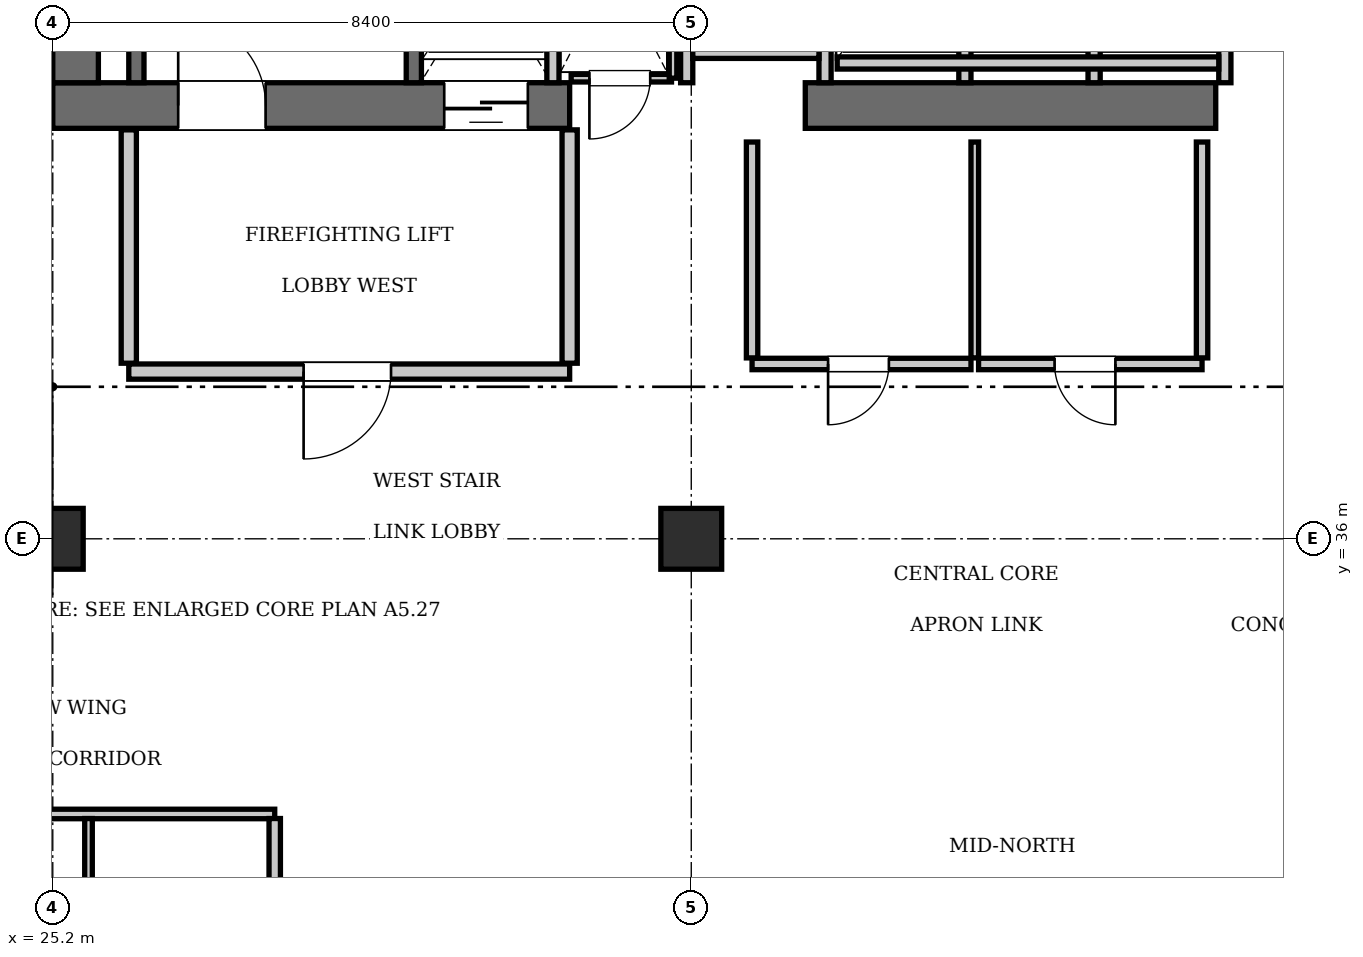
"""IFC4 building model, lengths in metres.
Left out: names, types, materials, properties, quantities, classifications, styles, units other than length and angle.
Written with IfcOpenShell. Run it as: python <this file> out.ifc"""

import sys

from ifc_helpers import new_model, si_unit, direction, frame, frame_2d, origin, origin_2d, place, context, subcontext, project, spatial, rectangle, extrude, element, fill, save


model = new_model("IFC4")
c1 = context("Model", 3, precision=1e-05, world=origin(), true_north=direction((0.0, 1.0)))
c2 = subcontext(c1, "Body", "Model", "MODEL_VIEW")
j1 = project(units=[si_unit("LENGTHUNIT", "METRE"), si_unit("PLANEANGLEUNIT", "RADIAN")], contexts=[c1])
p1 = place(None, origin())
s1 = spatial("IfcSite", under=j1, at=p1, CompositionType="ELEMENT")
p2 = place(p1, origin())
s2 = spatial("IfcBuilding", under=s1, at=p2, CompositionType="ELEMENT")
p3 = place(p2, frame((0.0, 0.0, 312.55)))
s3 = spatial("IfcBuildingStorey", under=s2, at=p3, CompositionType="ELEMENT", Elevation=312.55)
p4 = place(p3, frame((25.2, 41.7, 0.0), z_axis=(0.0, 0.0, 1.0), x_axis=(1.0, 0.0, 0.0)))
e1 = element("IfcWall", 1, at=p4, inside=s3, PredefinedType="SHEAR", context=c2, shape_type="SweptSolid", body=[
    extrude(rectangle(XDim=6.8, YDim=0.6, at=frame_2d((3.4, 0.0))), origin(), (0.0, 0.0, 1.0), 3.85),
])
p5 = place(p4, frame((1.65, 0.0, 0.0)))
e2 = element("IfcOpeningElement", 2, at=p5, cuts=e1, PredefinedType="OPENING", context=c2, shape_type="SweptSolid", body=[
    extrude(rectangle(XDim=1.15, YDim=2.15, at=frame_2d((0.575, 1.075))), frame((0.0, 0.31, 0.0), z_axis=(0.0, -1.0, 0.0), x_axis=(1.0, 0.0, 0.0)), (0.0, 0.0, 1.0), 0.62),
])
p6 = place(p4, frame((5.15, 0.0, 0.0)))
e3 = element("IfcOpeningElement", 3, at=p6, cuts=e1, PredefinedType="OPENING", context=c2, shape_type="SweptSolid", body=[
    extrude(rectangle(XDim=1.1, YDim=2.2, at=frame_2d((0.55, 1.1))), frame((0.0, 0.31, 0.0), z_axis=(0.0, -1.0, 0.0), x_axis=(1.0, 0.0, 0.0)), (0.0, 0.0, 1.0), 0.62),
])
p7 = place(p3, frame((35.1, 41.7, 0.0), z_axis=(0.0, 0.0, 1.0), x_axis=(1.0, 0.0, 0.0)))
e4 = element("IfcWall", 4, at=p7, inside=s3, PredefinedType="SHEAR", context=c2, shape_type="SweptSolid", body=[
    extrude(rectangle(XDim=5.4, YDim=0.6, at=frame_2d((2.7, 0.0))), origin(), (0.0, 0.0, 1.0), 3.85),
])
p8 = place(p3, frame((25.5, 42.0, 0.0), z_axis=(0.0, 0.0, 1.0), x_axis=(0.0, 1.0, 0.0)))
e5 = element("IfcWall", 5, at=p8, inside=s3, PredefinedType="SHEAR", context=c2, shape_type="SweptSolid", body=[
    extrude(rectangle(XDim=2.2, YDim=0.6, at=frame_2d((1.1, 0.0))), origin(), (0.0, 0.0, 1.0), 3.85),
])
for number, where, z_axis, x_axis in (
    (6, (25.2, 36.0, 0.0), (0.0, 0.0, 1.0), (1.0, 0.0, 0.0)),
    (7, (33.6, 36.0, 0.0), (0.0, 0.0, 1.0), (1.0, 0.0, 0.0)),
):
    element("IfcColumn", number, at=place(p3, frame(where, z_axis=z_axis, x_axis=x_axis)), inside=s3, PredefinedType="COLUMN", context=c2, shape_type="SweptSolid", body=[
        extrude(rectangle(XDim=0.8, YDim=0.8, at=origin_2d()), origin(), (0.0, 0.0, 1.0), 3.85),
    ])
p9 = place(p3, frame((29.95, 42.0, 0.0), z_axis=(0.0, 0.0, 1.0), x_axis=(0.0, 1.0, 0.0)))
e8 = element("IfcWall", 8, at=p9, inside=s3, PredefinedType="SOLIDWALL", context=c2, shape_type="SweptSolid", body=[
    extrude(rectangle(XDim=9.15, YDim=0.2, at=frame_2d((4.575, 0.0))), origin(), (0.0, 0.0, 1.0), 3.55),
])
p10 = place(p3, frame((26.3, 42.0, 0.0), z_axis=(0.0, 0.0, 1.0), x_axis=(0.0, 1.0, 0.0)))
e9 = element("IfcWall", 9, at=p10, inside=s3, PredefinedType="SOLIDWALL", context=c2, shape_type="SweptSolid", body=[
    extrude(rectangle(XDim=9.12, YDim=0.2, at=frame_2d((4.56, 0.0))), origin(), (0.0, 0.0, 1.0), 3.55),
])
p11 = place(p3, frame((31.78, 42.0, 0.0), z_axis=(0.0, 0.0, 1.0), x_axis=(0.0, 1.0, 0.0)))
e10 = element("IfcWall", 10, at=p11, inside=s3, PredefinedType="SOLIDWALL", context=c2, shape_type="SweptSolid", body=[
    extrude(rectangle(XDim=2.74, YDim=0.16, at=frame_2d((1.37, 0.0))), origin(), (0.0, 0.0, 1.0), 3.55),
])
for number, where, z_axis, x_axis in (
    (11, (37.2, 42.0, 0.0), (0.0, 0.0, 1.0), (0.0, 1.0, 0.0)),
    (12, (38.9, 42.0, 0.0), (0.0, 0.0, 1.0), (0.0, 1.0, 0.0)),
    (13, (40.62, 42.0, 0.0), (0.0, 0.0, 1.0), (0.0, 1.0, 0.0)),
):
    element("IfcWall", number, at=place(p3, frame(where, z_axis=z_axis, x_axis=x_axis)), inside=s3, PredefinedType="SOLIDWALL", context=c2, shape_type="SweptSolid", body=[
        extrude(rectangle(XDim=2.35, YDim=0.16, at=frame_2d((1.175, 0.0))), origin(), (0.0, 0.0, 1.0), 3.55),
    ])
p12 = place(p3, frame((35.52, 42.26, 0.0), z_axis=(0.0, 0.0, 1.0), x_axis=(1.0, 0.0, 0.0)))
e14 = element("IfcWall", 14, at=p12, inside=s3, PredefinedType="SOLIDWALL", context=c2, shape_type="SweptSolid", body=[
    extrude(rectangle(XDim=5.02, YDim=0.16, at=frame_2d((2.51, 0.0))), origin(), (0.0, 0.0, 1.0), 3.55),
])
for number, where, z_axis, x_axis in (
    (15, (33.54, 42.0, 0.0), (0.0, 0.0, 1.0), (0.0, 1.0, 0.0)),
    (16, (35.36, 42.0, 0.0), (0.0, 0.0, 1.0), (0.0, 1.0, 0.0)),
):
    element("IfcWall", number, at=place(p3, frame(where, z_axis=z_axis, x_axis=x_axis)), inside=s3, PredefinedType="SOLIDWALL", context=c2, shape_type="SweptSolid", body=[
        extrude(rectangle(XDim=2.4, YDim=0.16, at=frame_2d((1.2, 0.0))), origin(), (0.0, 0.0, 1.0), 3.55),
    ])
p13 = place(p3, frame((33.62, 42.4, 0.0), z_axis=(0.0, 0.0, 1.0), x_axis=(1.0, 0.0, 0.0)))
e17 = element("IfcWall", 17, at=p13, inside=s3, PredefinedType="SOLIDWALL", context=c2, shape_type="SweptSolid", body=[
    extrude(rectangle(XDim=1.66, YDim=0.16, at=frame_2d((0.83, 0.0))), origin(), (0.0, 0.0, 1.0), 3.55),
])
p14 = place(p3, frame((26.2, 38.2, 0.0), z_axis=(0.0, 0.0, 1.0), x_axis=(1.0, 0.0, 0.0)))
e18 = element("IfcWall", 18, at=p14, inside=s3, PredefinedType="PARTITIONING", context=c2, shape_type="SweptSolid", body=[
    extrude(rectangle(XDim=5.8, YDim=0.2, at=frame_2d((2.9, 0.0))), origin(), (0.0, 0.0, 1.0), 3.55),
])
p15 = place(p14, frame((2.3, 0.0, 0.0)))
e19 = element("IfcOpeningElement", 19, at=p15, cuts=e18, PredefinedType="OPENING", context=c2, shape_type="SweptSolid", body=[
    extrude(rectangle(XDim=1.15, YDim=2.15, at=frame_2d((0.575, 1.075))), frame((0.0, 0.11, 0.0), z_axis=(0.0, -1.0, 0.0), x_axis=(1.0, 0.0, 0.0)), (0.0, 0.0, 1.0), 0.22),
])
for number, where, z_axis, x_axis in (
    (20, (26.2, 38.31, 0.0), (0.0, 0.0, 1.0), (0.0, 1.0, 0.0)),
    (21, (32.0, 38.31, 0.0), (0.0, 0.0, 1.0), (0.0, 1.0, 0.0)),
):
    element("IfcWall", number, at=place(p3, frame(where, z_axis=z_axis, x_axis=x_axis)), inside=s3, PredefinedType="PARTITIONING", context=c2, shape_type="SweptSolid", body=[
        extrude(rectangle(XDim=3.07, YDim=0.2, at=frame_2d((1.535, 0.0))), origin(), (0.0, 0.0, 1.0), 3.55),
    ])
p16 = place(p3, frame((32.02, 42.06, 0.0), z_axis=(0.0, 0.0, 1.0), x_axis=(1.0, 0.0, 0.0)))
e22 = element("IfcWall", 22, at=p16, inside=s3, PredefinedType="PARTITIONING", context=c2, shape_type="SweptSolid", body=[
    extrude(rectangle(XDim=1.32, YDim=0.1, at=frame_2d((0.66, 0.0))), origin(), (0.0, 0.0, 1.0), 3.55),
])
p17 = place(p16, frame((0.24, 0.0, 0.0)))
e23 = element("IfcOpeningElement", 23, at=p17, cuts=e22, PredefinedType="OPENING", context=c2, shape_type="SweptSolid", body=[
    extrude(rectangle(XDim=0.8, YDim=2.05, at=frame_2d((0.4, 1.025))), frame((0.0, 0.06, 0.0), z_axis=(0.0, -1.0, 0.0), x_axis=(1.0, 0.0, 0.0)), (0.0, 0.0, 1.0), 0.12),
])
p18 = place(p3, frame((33.36, 42.06, 0.0), z_axis=(0.0, 0.0, 1.0), x_axis=(0.0, 1.0, 0.0)))
e24 = element("IfcWall", 24, at=p18, inside=s3, PredefinedType="PARTITIONING", context=c2, shape_type="SweptSolid", body=[
    extrude(rectangle(XDim=2.88, YDim=0.1, at=frame_2d((1.44, 0.0))), origin(), (0.0, 0.0, 1.0), 3.55),
])
p19 = place(p3, frame((34.4, 38.3, 0.0), z_axis=(0.0, 0.0, 1.0), x_axis=(1.0, 0.0, 0.0)))
e25 = element("IfcWall", 25, at=p19, inside=s3, PredefinedType="PARTITIONING", context=c2, shape_type="SweptSolid", body=[
    extrude(rectangle(XDim=2.88, YDim=0.15, at=frame_2d((1.44, 0.0))), origin(), (0.0, 0.0, 1.0), 3.55),
])
p20 = place(p19, frame((1.0, 0.0, 0.0)))
e26 = element("IfcOpeningElement", 26, at=p20, cuts=e25, PredefinedType="OPENING", context=c2, shape_type="SweptSolid", body=[
    extrude(rectangle(XDim=0.8, YDim=2.05, at=frame_2d((0.4, 1.025))), frame((0.0, 0.085, 0.0), z_axis=(0.0, -1.0, 0.0), x_axis=(1.0, 0.0, 0.0)), (0.0, 0.0, 1.0), 0.17),
])
p21 = place(p3, frame((37.38, 38.3, 0.0), z_axis=(0.0, 0.0, 1.0), x_axis=(1.0, 0.0, 0.0)))
e27 = element("IfcWall", 27, at=p21, inside=s3, PredefinedType="PARTITIONING", context=c2, shape_type="SweptSolid", body=[
    extrude(rectangle(XDim=2.94, YDim=0.15, at=frame_2d((1.47, 0.0))), origin(), (0.0, 0.0, 1.0), 3.55),
])
p22 = place(p21, frame((1.0, 0.0, 0.0)))
e28 = element("IfcOpeningElement", 28, at=p22, cuts=e27, PredefinedType="OPENING", context=c2, shape_type="SweptSolid", body=[
    extrude(rectangle(XDim=0.8, YDim=2.05, at=frame_2d((0.4, 1.025))), frame((0.0, 0.085, 0.0), z_axis=(0.0, -1.0, 0.0), x_axis=(1.0, 0.0, 0.0)), (0.0, 0.0, 1.0), 0.17),
])
p23 = place(p3, frame((34.4, 38.38, 0.0), z_axis=(0.0, 0.0, 1.0), x_axis=(0.0, 1.0, 0.0)))
e29 = element("IfcWall", 29, at=p23, inside=s3, PredefinedType="PARTITIONING", context=c2, shape_type="SweptSolid", body=[
    extrude(rectangle(XDim=2.84, YDim=0.15, at=frame_2d((1.42, 0.0))), origin(), (0.0, 0.0, 1.0), 3.55),
])
p24 = place(p3, frame((37.33, 38.38, 0.0), z_axis=(0.0, 0.0, 1.0), x_axis=(0.0, 1.0, 0.0)))
e30 = element("IfcWall", 30, at=p24, inside=s3, PredefinedType="PARTITIONING", context=c2, shape_type="SweptSolid", body=[
    extrude(rectangle(XDim=2.84, YDim=0.1, at=frame_2d((1.42, 0.0))), origin(), (0.0, 0.0, 1.0), 3.55),
])
p25 = place(p3, frame((40.32, 38.38, 0.0), z_axis=(0.0, 0.0, 1.0), x_axis=(0.0, 1.0, 0.0)))
e31 = element("IfcWall", 31, at=p25, inside=s3, PredefinedType="PARTITIONING", context=c2, shape_type="SweptSolid", body=[
    extrude(rectangle(XDim=2.84, YDim=0.15, at=frame_2d((1.42, 0.0))), origin(), (0.0, 0.0, 1.0), 3.55),
])
p26 = place(p3, frame((15.5, 32.38, 0.0), z_axis=(0.0, 0.0, 1.0), x_axis=(1.0, 0.0, 0.0)))
e32 = element("IfcWall", 32, at=p26, inside=s3, PredefinedType="PARTITIONING", context=c2, shape_type="SweptSolid", body=[
    extrude(rectangle(XDim=12.62, YDim=0.125, at=frame_2d((6.31, 0.0))), origin(), (0.0, 0.0, 1.0), 3.55),
])
p27 = place(p3, frame((28.12, 30.43, 0.0), z_axis=(0.0, 0.0, 1.0), x_axis=(0.0, 1.0, 0.0)))
e33 = element("IfcWall", 33, at=p27, inside=s3, PredefinedType="PARTITIONING", context=c2, shape_type="SweptSolid", body=[
    extrude(rectangle(XDim=1.89, YDim=0.15, at=frame_2d((0.945, 0.0))), origin(), (0.0, 0.0, 1.0), 3.55),
])
p28 = place(p3, frame((25.67, 30.43, 0.0), z_axis=(0.0, 0.0, 1.0), x_axis=(0.0, 1.0, 0.0)))
e34 = element("IfcWall", 34, at=p28, inside=s3, PredefinedType="PARTITIONING", context=c2, shape_type="SweptSolid", body=[
    extrude(rectangle(XDim=1.89, YDim=0.1, at=frame_2d((0.945, 0.0))), origin(), (0.0, 0.0, 1.0), 3.55),
])
p29 = place(p5, origin())
e35 = element("IfcDoor", 35, at=p29, inside=s3, OperationType="SINGLE_SWING_LEFT", PredefinedType="DOOR", context=c2, shape_type="SweptSolid", body=[
    extrude(rectangle(XDim=1.15, YDim=2.15, at=frame_2d((0.575, 1.075))), frame((0.0, 0.025, 0.0), z_axis=(0.0, -1.0, 0.0), x_axis=(1.0, 0.0, 0.0)), (0.0, 0.0, 1.0), 0.05),
])
fill(e2, e35)
p30 = place(p6, frame((1.1, 0.0, 0.0), z_axis=(0.0, 0.0, 1.0), x_axis=(-1.0, 0.0, 0.0)))
e36 = element("IfcDoor", 36, at=p30, inside=s3, OperationType="SLIDING_TO_LEFT", PredefinedType="DOOR", context=c2, shape_type="SweptSolid", body=[
    extrude(rectangle(XDim=1.1, YDim=2.2, at=frame_2d((0.55, 1.1))), frame((0.0, 0.025, 0.0), z_axis=(0.0, -1.0, 0.0), x_axis=(1.0, 0.0, 0.0)), (0.0, 0.0, 1.0), 0.05),
])
fill(e3, e36)
p31 = place(p15, frame((1.15, 0.0, 0.0), z_axis=(0.0, 0.0, 1.0), x_axis=(-1.0, 0.0, 0.0)))
e37 = element("IfcDoor", 37, at=p31, inside=s3, OperationType="SINGLE_SWING_RIGHT", PredefinedType="DOOR", context=c2, shape_type="SweptSolid", body=[
    extrude(rectangle(XDim=1.15, YDim=2.15, at=frame_2d((0.575, 1.075))), frame((0.0, 0.025, 0.0), z_axis=(0.0, -1.0, 0.0), x_axis=(1.0, 0.0, 0.0)), (0.0, 0.0, 1.0), 0.05),
])
fill(e19, e37)
p32 = place(p17, frame((0.8, 0.0, 0.0), z_axis=(0.0, 0.0, 1.0), x_axis=(-1.0, 0.0, 0.0)))
e38 = element("IfcDoor", 38, at=p32, inside=s3, OperationType="SINGLE_SWING_RIGHT", PredefinedType="DOOR", context=c2, shape_type="SweptSolid", body=[
    extrude(rectangle(XDim=0.8, YDim=2.05, at=frame_2d((0.4, 1.025))), frame((0.0, 0.025, 0.0), z_axis=(0.0, -1.0, 0.0), x_axis=(1.0, 0.0, 0.0)), (0.0, 0.0, 1.0), 0.05),
])
fill(e23, e38)
p33 = place(p20, frame((0.8, 0.0, 0.0), z_axis=(0.0, 0.0, 1.0), x_axis=(-1.0, 0.0, 0.0)))
e39 = element("IfcDoor", 39, at=p33, inside=s3, OperationType="SINGLE_SWING_RIGHT", PredefinedType="DOOR", context=c2, shape_type="SweptSolid", body=[
    extrude(rectangle(XDim=0.8, YDim=2.05, at=frame_2d((0.4, 1.025))), frame((0.0, 0.025, 0.0), z_axis=(0.0, -1.0, 0.0), x_axis=(1.0, 0.0, 0.0)), (0.0, 0.0, 1.0), 0.05),
])
fill(e26, e39)
p34 = place(p22, frame((0.8, 0.0, 0.0), z_axis=(0.0, 0.0, 1.0), x_axis=(-1.0, 0.0, 0.0)))
e40 = element("IfcDoor", 40, at=p34, inside=s3, OperationType="SINGLE_SWING_LEFT", PredefinedType="DOOR", context=c2, shape_type="SweptSolid", body=[
    extrude(rectangle(XDim=0.8, YDim=2.05, at=frame_2d((0.4, 1.025))), frame((0.0, 0.025, 0.0), z_axis=(0.0, -1.0, 0.0), x_axis=(1.0, 0.0, 0.0)), (0.0, 0.0, 1.0), 0.05),
])
fill(e28, e40)
save(model, sys.argv[1])
